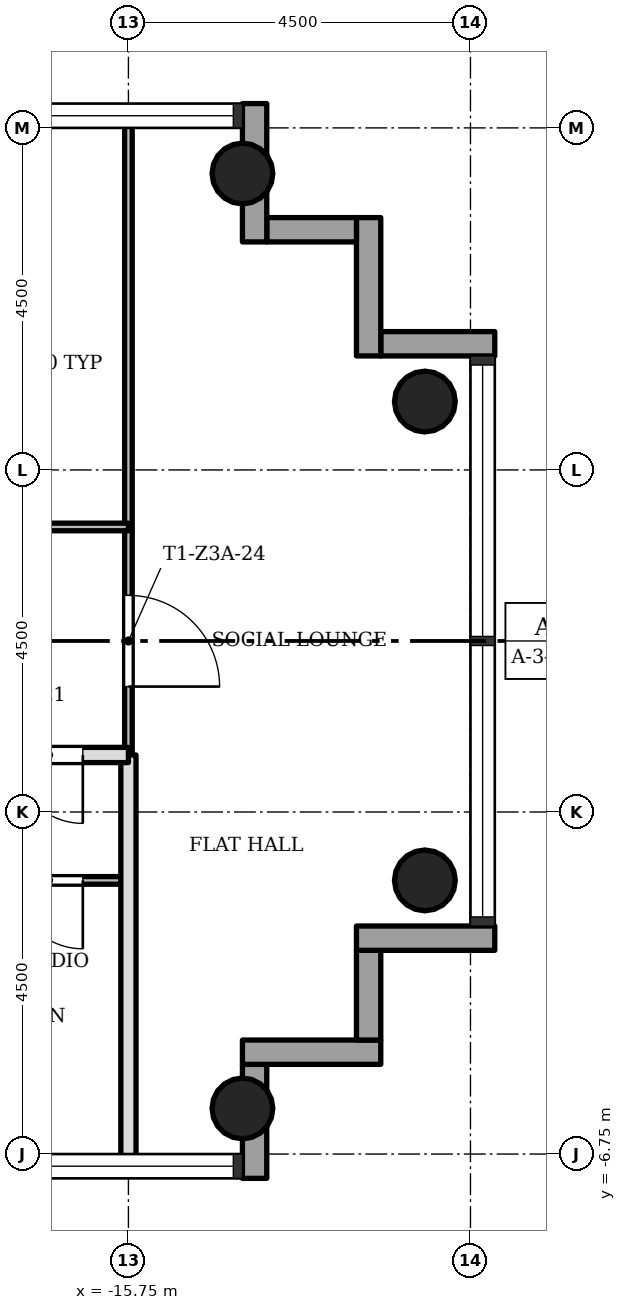
"""IFC4 building model, lengths in metres.
Left out: names, types, materials, properties, quantities, classifications, styles, units other than length and angle.
Written with IfcOpenShell. Run it as: python <this file> out.ifc"""

import sys

from ifc_helpers import new_model, si_unit, direction, frame, frame_2d, origin, origin_2d, place, context, subcontext, project, spatial, rectangle, hollow_circle, extrude, element, fill, save


model = new_model("IFC4")
c1 = context("Model", 3, precision=1e-05, world=origin(), true_north=direction((0.0, 1.0)))
c2 = subcontext(c1, "Body", "Model", "MODEL_VIEW")
j1 = project(units=[si_unit("LENGTHUNIT", "METRE"), si_unit("PLANEANGLEUNIT", "RADIAN")], contexts=[c1])
p1 = place(None, origin())
s1 = spatial("IfcSite", under=j1, at=p1, CompositionType="ELEMENT")
p2 = place(p1, origin())
s2 = spatial("IfcBuilding", under=s1, at=p2, CompositionType="ELEMENT")
p3 = place(p2, frame((0.0, 0.0, 133.7)))
s3 = spatial("IfcBuildingStorey", under=s2, at=p3, CompositionType="ELEMENT", Elevation=133.7)
for number, where, z_axis, x_axis in (
    (1, (-14.25, -6.15, 0.0), (0.0, 0.0, 1.0), (1.0, 0.0, 0.0)),
    (2, (-14.25, 6.15, 0.0), (0.0, 0.0, 1.0), (1.0, 0.0, 0.0)),
    (3, (-11.85, -3.15, 0.0), (0.0, 0.0, 1.0), (1.0, 0.0, 0.0)),
    (4, (-11.85, 3.15, 0.0), (0.0, 0.0, 1.0), (1.0, 0.0, 0.0)),
):
    element("IfcColumn", number, at=place(p3, frame(where, z_axis=z_axis, x_axis=x_axis)), inside=s3, PredefinedType="COLUMN", context=c2, shape_type="SweptSolid", body=[
        extrude(hollow_circle(Radius=0.4, WallThickness=0.028, at=origin_2d()), origin(), (0.0, 0.0, 1.0), 3.4),
    ])
p4 = place(p3, frame((-14.09, -7.07, -0.3), z_axis=(0.0, 0.0, 1.0), x_axis=(0.0, 1.0, 0.0)))
e5 = element("IfcWall", 5, at=p4, inside=s3, PredefinedType="STANDARD", context=c2, shape_type="SweptSolid", body=[
    extrude(rectangle(XDim=1.5, YDim=0.32, at=frame_2d((0.75, 0.0))), origin(), (0.0, 0.0, 1.0), 3.4),
])
p5 = place(p3, frame((-14.25, -5.41, -0.3), z_axis=(0.0, 0.0, 1.0), x_axis=(1.0, 0.0, 0.0)))
e6 = element("IfcWall", 6, at=p5, inside=s3, PredefinedType="STANDARD", context=c2, shape_type="SweptSolid", body=[
    extrude(rectangle(XDim=1.82, YDim=0.32, at=frame_2d((0.91, 0.0))), origin(), (0.0, 0.0, 1.0), 3.4),
])
p6 = place(p3, frame((-12.59, -5.25, -0.3), z_axis=(0.0, 0.0, 1.0), x_axis=(0.0, 1.0, 0.0)))
e7 = element("IfcWall", 7, at=p6, inside=s3, PredefinedType="STANDARD", context=c2, shape_type="SweptSolid", body=[
    extrude(rectangle(XDim=1.18, YDim=0.32, at=frame_2d((0.59, 0.0))), origin(), (0.0, 0.0, 1.0), 3.4),
])
p7 = place(p3, frame((-12.75, -3.91, -0.3), z_axis=(0.0, 0.0, 1.0), x_axis=(1.0, 0.0, 0.0)))
e8 = element("IfcWall", 8, at=p7, inside=s3, PredefinedType="STANDARD", context=c2, shape_type="SweptSolid", body=[
    extrude(rectangle(XDim=1.82, YDim=0.32, at=frame_2d((0.91, 0.0))), origin(), (0.0, 0.0, 1.0), 3.4),
])
p8 = place(p3, frame((-10.93, 3.91, -0.3), z_axis=(0.0, 0.0, 1.0), x_axis=(-1.0, 0.0, 0.0)))
e9 = element("IfcWall", 9, at=p8, inside=s3, PredefinedType="STANDARD", context=c2, shape_type="SweptSolid", body=[
    extrude(rectangle(XDim=1.5, YDim=0.32, at=frame_2d((0.75, 0.0))), origin(), (0.0, 0.0, 1.0), 3.4),
])
p9 = place(p3, frame((-12.59, 3.75, -0.3), z_axis=(0.0, 0.0, 1.0), x_axis=(0.0, 1.0, 0.0)))
e10 = element("IfcWall", 10, at=p9, inside=s3, PredefinedType="STANDARD", context=c2, shape_type="SweptSolid", body=[
    extrude(rectangle(XDim=1.82, YDim=0.32, at=frame_2d((0.91, 0.0))), origin(), (0.0, 0.0, 1.0), 3.4),
])
p10 = place(p3, frame((-12.75, 5.41, -0.3), z_axis=(0.0, 0.0, 1.0), x_axis=(-1.0, 0.0, 0.0)))
e11 = element("IfcWall", 11, at=p10, inside=s3, PredefinedType="STANDARD", context=c2, shape_type="SweptSolid", body=[
    extrude(rectangle(XDim=1.18, YDim=0.32, at=frame_2d((0.59, 0.0))), origin(), (0.0, 0.0, 1.0), 3.4),
])
p11 = place(p3, frame((-14.09, 5.25, -0.3), z_axis=(0.0, 0.0, 1.0), x_axis=(0.0, 1.0, 0.0)))
e12 = element("IfcWall", 12, at=p11, inside=s3, PredefinedType="STANDARD", context=c2, shape_type="SweptSolid", body=[
    extrude(rectangle(XDim=1.82, YDim=0.32, at=frame_2d((0.91, 0.0))), origin(), (0.0, 0.0, 1.0), 3.4),
])
p12 = place(p3, frame((-15.75, -1.5, 0.0), z_axis=(0.0, 0.0, 1.0), x_axis=(0.0, 1.0, 0.0)))
e13 = element("IfcWall", 13, at=p12, inside=s3, PredefinedType="PARTITIONING", context=c2, shape_type="SweptSolid", body=[
    extrude(rectangle(XDim=8.35, YDim=0.1, at=frame_2d((4.175, 0.0))), origin(), (0.0, 0.0, 1.0), 3.0),
])
p13 = place(p12, frame((0.9, 0.0, 0.0)))
e14 = element("IfcOpeningElement", 14, at=p13, cuts=e13, PredefinedType="OPENING", context=c2, shape_type="SweptSolid", body=[
    extrude(rectangle(XDim=1.2, YDim=2.1, at=frame_2d((0.6, 1.05))), frame((0.0, 0.06, 0.0), z_axis=(0.0, -1.0, 0.0), x_axis=(1.0, 0.0, 0.0)), (0.0, 0.0, 1.0), 0.12),
])
p14 = place(p3, frame((-15.75, -6.85, 0.0), z_axis=(0.0, 0.0, 1.0), x_axis=(0.0, 1.0, 0.0)))
e15 = element("IfcWall", 15, at=p14, inside=s3, PredefinedType="SOLIDWALL", context=c2, shape_type="SweptSolid", body=[
    extrude(rectangle(XDim=5.35, YDim=0.2, at=frame_2d((2.675, 0.0))), origin(), (0.0, 0.0, 1.0), 3.0),
])
p15 = place(p3, frame((-20.25, -3.15, 0.0), z_axis=(0.0, 0.0, 1.0), x_axis=(1.0, 0.0, 0.0)))
e16 = element("IfcWall", 16, at=p15, inside=s3, PredefinedType="PARTITIONING", context=c2, shape_type="SweptSolid", body=[
    extrude(rectangle(XDim=4.5, YDim=0.1, at=frame_2d((2.25, 0.0))), origin(), (0.0, 0.0, 1.0), 3.0),
])
p16 = place(p15, frame((3.0, 0.0, 0.0)))
e17 = element("IfcOpeningElement", 17, at=p16, cuts=e16, PredefinedType="OPENING", context=c2, shape_type="SweptSolid", body=[
    extrude(rectangle(XDim=0.9, YDim=2.1, at=frame_2d((0.45, 1.05))), frame((0.0, 0.06, 0.0), z_axis=(0.0, -1.0, 0.0), x_axis=(1.0, 0.0, 0.0)), (0.0, 0.0, 1.0), 0.12),
])
p17 = place(p3, frame((-20.25, -1.5, 0.0), z_axis=(0.0, 0.0, 1.0), x_axis=(1.0, 0.0, 0.0)))
e18 = element("IfcWall", 18, at=p17, inside=s3, PredefinedType="SOLIDWALL", context=c2, shape_type="SweptSolid", body=[
    extrude(rectangle(XDim=4.5, YDim=0.2, at=frame_2d((2.25, 0.0))), origin(), (0.0, 0.0, 1.0), 3.0),
])
p18 = place(p17, frame((3.0, 0.0, 0.0)))
e19 = element("IfcOpeningElement", 19, at=p18, cuts=e18, PredefinedType="OPENING", context=c2, shape_type="SweptSolid", body=[
    extrude(rectangle(XDim=0.9, YDim=2.1, at=frame_2d((0.45, 1.05))), frame((0.0, 0.11, 0.0), z_axis=(0.0, -1.0, 0.0), x_axis=(1.0, 0.0, 0.0)), (0.0, 0.0, 1.0), 0.22),
])
p19 = place(p3, frame((-20.25, 1.5, 0.0), z_axis=(0.0, 0.0, 1.0), x_axis=(1.0, 0.0, 0.0)))
e20 = element("IfcWall", 20, at=p19, inside=s3, PredefinedType="PARTITIONING", context=c2, shape_type="SweptSolid", body=[
    extrude(rectangle(XDim=4.5, YDim=0.1, at=frame_2d((2.25, 0.0))), origin(), (0.0, 0.0, 1.0), 3.0),
])
p20 = place(p19, frame((1.8, 0.0, 0.0)))
e21 = element("IfcOpeningElement", 21, at=p20, cuts=e20, PredefinedType="OPENING", context=c2, shape_type="SweptSolid", body=[
    extrude(rectangle(XDim=0.9, YDim=2.1, at=frame_2d((0.45, 1.05))), frame((0.0, 0.06, 0.0), z_axis=(0.0, -1.0, 0.0), x_axis=(1.0, 0.0, 0.0)), (0.0, 0.0, 1.0), 0.12),
])
p21 = place(p18, origin())
e22 = element("IfcDoor", 22, at=p21, inside=s3, OperationType="SINGLE_SWING_RIGHT", PredefinedType="DOOR", context=c2, shape_type="SweptSolid", body=[
    extrude(rectangle(XDim=0.9, YDim=2.1, at=frame_2d((0.45, 1.05))), frame((0.0, 0.025, 0.0), z_axis=(0.0, -1.0, 0.0), x_axis=(1.0, 0.0, 0.0)), (0.0, 0.0, 1.0), 0.05),
])
fill(e19, e22)
p22 = place(p16, origin())
e23 = element("IfcDoor", 23, at=p22, inside=s3, OperationType="SINGLE_SWING_RIGHT", PredefinedType="DOOR", context=c2, shape_type="SweptSolid", body=[
    extrude(rectangle(XDim=0.9, YDim=2.1, at=frame_2d((0.45, 1.05))), frame((0.0, 0.025, 0.0), z_axis=(0.0, -1.0, 0.0), x_axis=(1.0, 0.0, 0.0)), (0.0, 0.0, 1.0), 0.05),
])
fill(e17, e23)
p23 = place(p13, origin())
e24 = element("IfcDoor", 24, at=p23, inside=s3, OperationType="SINGLE_SWING_LEFT", PredefinedType="DOOR", context=c2, shape_type="SweptSolid", body=[
    extrude(rectangle(XDim=1.2, YDim=2.1, at=frame_2d((0.6, 1.05))), frame((0.0, 0.025, 0.0), z_axis=(0.0, -1.0, 0.0), x_axis=(1.0, 0.0, 0.0)), (0.0, 0.0, 1.0), 0.05),
])
fill(e14, e24)
save(model, sys.argv[1])
